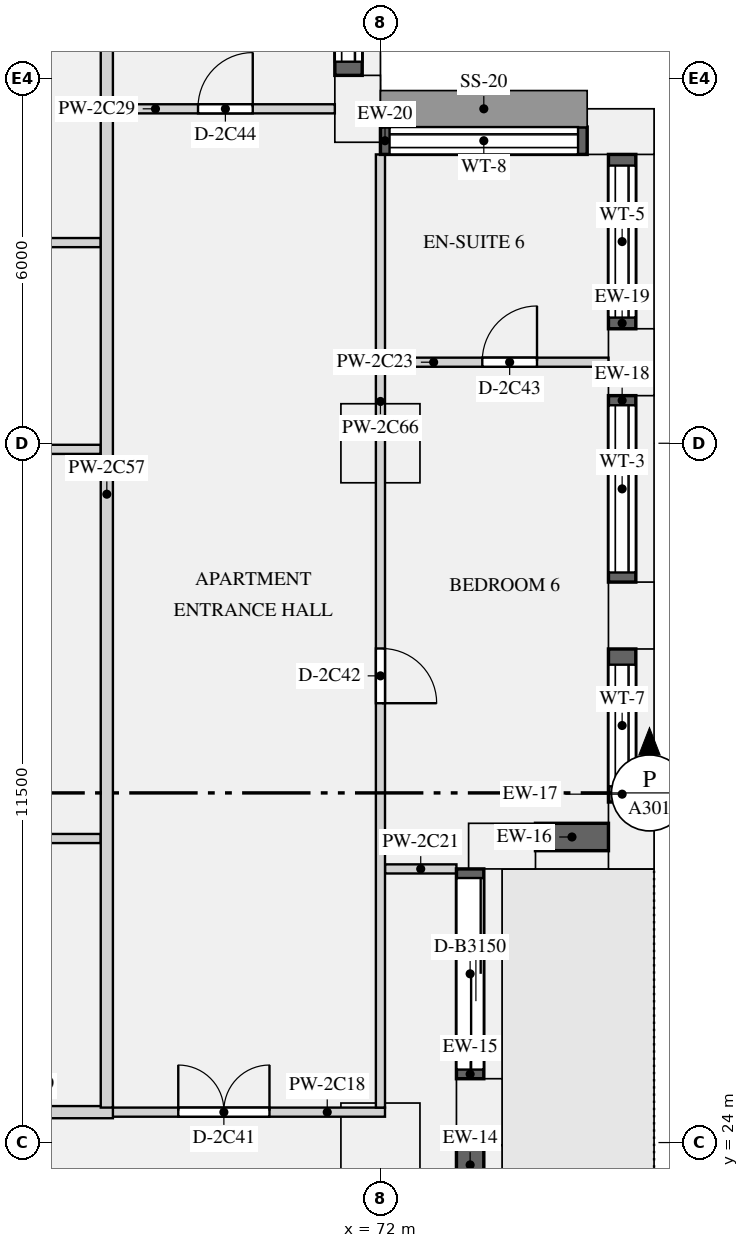
"""IFC4 building model, lengths in metres.
Left out: names, types, materials, properties, quantities, classifications, styles, units other than length and angle.
Written with IfcOpenShell. Run it as: python <this file> out.ifc"""

import sys

from ifc_helpers import new_model, si_unit, direction, frame, frame_2d, origin, origin_2d, place, context, subcontext, project, spatial, rectangle, extrude, element, fill, save


model = new_model("IFC4")
c1 = context("Model", 3, precision=1e-05, world=origin(), true_north=direction((0.0, 1.0)))
c2 = subcontext(c1, "Body", "Model", "MODEL_VIEW")
j1 = project(units=[si_unit("LENGTHUNIT", "METRE"), si_unit("PLANEANGLEUNIT", "RADIAN")], contexts=[c1])
p1 = place(None, origin())
s1 = spatial("IfcSite", under=j1, at=p1, CompositionType="ELEMENT")
p2 = place(p1, origin())
s2 = spatial("IfcBuilding", under=s1, at=p2, CompositionType="ELEMENT")
p3 = place(p2, frame((0.0, 0.0, 102.45)))
s3 = spatial("IfcBuildingStorey", under=s2, at=p3, CompositionType="ELEMENT", Elevation=102.45)
for number, where, z_axis, x_axis in (
    (1, (73.625, 24.5, 0.0), (0.0, 0.0, 1.0), (0.0, 1.0, 0.0)),
    (2, (74.0, 28.875, 0.0), (0.0, 0.0, 1.0), (1.0, 0.0, 0.0)),
    (3, (76.125, 29.05, 0.0), (0.0, 0.0, 1.0), (0.0, 1.0, 0.0)),
    (4, (76.125, 32.667, 0.0), (0.0, 0.0, 1.0), (0.0, 1.0, 0.0)),
    (5, (76.125, 36.833, 0.0), (0.0, 0.0, 1.0), (0.0, 1.0, 0.0)),
    (6, (75.95, 40.625, 0.0), (0.0, 0.0, 1.0), (-1.0, 0.0, 0.0)),
    (7, (71.625, 41.0, 0.0), (0.0, 0.0, 1.0), (0.0, 1.0, 0.0)),
):
    element("IfcColumn", number, at=place(p3, frame(where, z_axis=z_axis, x_axis=x_axis)), inside=s3, PredefinedType="USERDEFINED", context=c2, shape_type="SweptSolid", body=[
        extrude(rectangle(XDim=1.1, YDim=0.75, at=origin_2d()), origin(), (0.0, 0.0, 1.0), 3.15),
    ])
for number, where, z_axis, x_axis in (
    (8, (72.0, 24.0, 0.0), (0.0, 0.0, 1.0), (1.0, 0.0, 0.0)),
    (9, (72.0, 35.5, 0.0), (0.0, 0.0, 1.0), (1.0, 0.0, 0.0)),
):
    element("IfcColumn", number, at=place(p3, frame(where, z_axis=z_axis, x_axis=x_axis)), inside=s3, PredefinedType="COLUMN", context=c2, shape_type="SweptSolid", body=[
        extrude(rectangle(XDim=1.3, YDim=1.3, at=origin_2d()), origin(), (0.0, 0.0, 1.0), 3.15),
    ])
p4 = place(p3, frame((73.475, 21.05, 0.0), z_axis=(0.0, 0.0, 1.0), x_axis=(0.0, 1.0, 0.0)))
e10 = element("IfcWall", 10, at=p4, inside=s3, PredefinedType="SOLIDWALL", context=c2, shape_type="SweptSolid", body=[
    extrude(rectangle(XDim=2.9, YDim=0.45, at=frame_2d((1.45, 0.0))), origin(), (0.0, 0.0, 1.0), 2.83),
])
p5 = place(p4, frame((0.165, 0.0, 0.0)))
e11 = element("IfcOpeningElement", 11, at=p5, cuts=e10, PredefinedType="OPENING", context=c2, shape_type="SweptSolid", body=[
    extrude(rectangle(XDim=2.1, YDim=2.3, at=frame_2d((1.05, 1.15))), frame((0.0, 0.235, 0.0), z_axis=(0.0, -1.0, 0.0), x_axis=(1.0, 0.0, 0.0)), (0.0, 0.0, 1.0), 0.47),
])
p6 = place(p3, frame((73.475, 25.05, 0.0), z_axis=(0.0, 0.0, 1.0), x_axis=(0.0, 1.0, 0.0)))
e12 = element("IfcWall", 12, at=p6, inside=s3, PredefinedType="SOLIDWALL", context=c2, shape_type="SweptSolid", body=[
    extrude(rectangle(XDim=3.45, YDim=0.45, at=frame_2d((1.725, 0.0))), origin(), (0.0, 0.0, 1.0), 2.83),
])
p7 = place(p6, frame((0.15, 0.0, 0.0)))
e13 = element("IfcOpeningElement", 13, at=p7, cuts=e12, PredefinedType="OPENING", context=c2, shape_type="SweptSolid", body=[
    extrude(rectangle(XDim=3.15, YDim=2.3, at=frame_2d((1.575, 1.15))), frame((0.0, 0.235, 0.0), z_axis=(0.0, -1.0, 0.0), x_axis=(1.0, 0.0, 0.0)), (0.0, 0.0, 1.0), 0.47),
])
p8 = place(p3, frame((74.55, 29.025, 0.9), z_axis=(0.0, 0.0, 1.0), x_axis=(1.0, 0.0, 0.0)))
e14 = element("IfcWall", 14, at=p8, inside=s3, PredefinedType="SOLIDWALL", context=c2, shape_type="SweptSolid", body=[
    extrude(rectangle(XDim=1.2, YDim=0.45, at=frame_2d((0.6, 0.0))), origin(), (0.0, 0.0, 1.0), 1.93),
])
p9 = place(p3, frame((75.975, 29.6, 0.9), z_axis=(0.0, 0.0, 1.0), x_axis=(0.0, 1.0, 0.0)))
e15 = element("IfcWall", 15, at=p9, inside=s3, PredefinedType="SOLIDWALL", context=c2, shape_type="SweptSolid", body=[
    extrude(rectangle(XDim=2.517, YDim=0.45, at=frame_2d((1.258, 0.0))), origin(), (0.0, 0.0, 1.0), 1.93),
])
p10 = place(p9, frame((0.259, 0.0, 0.15)))
e16 = element("IfcOpeningElement", 16, at=p10, cuts=e15, PredefinedType="OPENING", context=c2, shape_type="SweptSolid", body=[
    extrude(rectangle(XDim=2.0, YDim=1.5, at=frame_2d((1.0, 0.75))), frame((0.0, 0.235, 0.0), z_axis=(0.0, -1.0, 0.0), x_axis=(1.0, 0.0, 0.0)), (0.0, 0.0, 1.0), 0.47),
])
p11 = place(p3, frame((75.975, 33.217, 0.9), z_axis=(0.0, 0.0, 1.0), x_axis=(0.0, 1.0, 0.0)))
e17 = element("IfcWall", 17, at=p11, inside=s3, PredefinedType="SOLIDWALL", context=c2, shape_type="SweptSolid", body=[
    extrude(rectangle(XDim=3.066, YDim=0.45, at=frame_2d((1.533, 0.0))), origin(), (0.0, 0.0, 1.0), 1.93),
])
p12 = place(p11, frame((0.158, 0.0, 0.15)))
e18 = element("IfcOpeningElement", 18, at=p12, cuts=e17, PredefinedType="OPENING", context=c2, shape_type="SweptSolid", body=[
    extrude(rectangle(XDim=2.75, YDim=1.5, at=frame_2d((1.375, 0.75))), frame((0.0, 0.235, 0.0), z_axis=(0.0, -1.0, 0.0), x_axis=(1.0, 0.0, 0.0)), (0.0, 0.0, 1.0), 0.47),
])
p13 = place(p3, frame((75.975, 37.383, 0.9), z_axis=(0.0, 0.0, 1.0), x_axis=(0.0, 1.0, 0.0)))
e19 = element("IfcWall", 19, at=p13, inside=s3, PredefinedType="SOLIDWALL", context=c2, shape_type="SweptSolid", body=[
    extrude(rectangle(XDim=2.867, YDim=0.45, at=frame_2d((1.434, 0.0))), origin(), (0.0, 0.0, 1.0), 1.93),
])
p14 = place(p13, frame((0.184, 0.0, 0.15)))
e20 = element("IfcOpeningElement", 20, at=p14, cuts=e19, PredefinedType="OPENING", context=c2, shape_type="SweptSolid", body=[
    extrude(rectangle(XDim=2.5, YDim=1.5, at=frame_2d((1.25, 0.75))), frame((0.0, 0.235, 0.0), z_axis=(0.0, -1.0, 0.0), x_axis=(1.0, 0.0, 0.0)), (0.0, 0.0, 1.0), 0.47),
])
p15 = place(p3, frame((75.4, 40.475, 0.9), z_axis=(0.0, 0.0, 1.0), x_axis=(-1.0, 0.0, 0.0)))
e21 = element("IfcWall", 21, at=p15, inside=s3, PredefinedType="SOLIDWALL", context=c2, shape_type="SweptSolid", body=[
    extrude(rectangle(XDim=3.4, YDim=0.45, at=frame_2d((1.7, 0.0))), origin(), (0.0, 0.0, 1.0), 1.93),
])
p16 = place(p15, frame((0.15, 0.0, 0.15)))
e22 = element("IfcOpeningElement", 22, at=p16, cuts=e21, PredefinedType="OPENING", context=c2, shape_type="SweptSolid", body=[
    extrude(rectangle(XDim=3.1, YDim=1.5, at=frame_2d((1.55, 0.75))), frame((0.0, 0.235, 0.0), z_axis=(0.0, -1.0, 0.0), x_axis=(1.0, 0.0, 0.0)), (0.0, 0.0, 1.0), 0.47),
])
p17 = place(p3, frame((71.475, 41.55, 0.9), z_axis=(0.0, 0.0, 1.0), x_axis=(0.0, 1.0, 0.0)))
e23 = element("IfcWall", 23, at=p17, inside=s3, PredefinedType="SOLIDWALL", context=c2, shape_type="SweptSolid", body=[
    extrude(rectangle(XDim=3.2, YDim=0.45, at=frame_2d((1.6, 0.0))), origin(), (0.0, 0.0, 1.0), 1.93),
])
p18 = place(p17, frame((0.225, 0.0, 0.15)))
e24 = element("IfcOpeningElement", 24, at=p18, cuts=e23, PredefinedType="OPENING", context=c2, shape_type="SweptSolid", body=[
    extrude(rectangle(XDim=2.75, YDim=1.5, at=frame_2d((1.375, 0.75))), frame((0.0, 0.235, 0.0), z_axis=(0.0, -1.0, 0.0), x_axis=(1.0, 0.0, 0.0)), (0.0, 0.0, 1.0), 0.47),
])
p19 = place(p3, frame((67.4, 24.5, 0.0), z_axis=(0.0, 0.0, 1.0), x_axis=(1.0, 0.0, 0.0)))
e25 = element("IfcWall", 25, at=p19, inside=s3, PredefinedType="PARTITIONING", context=c2, shape_type="SweptSolid", body=[
    extrude(rectangle(XDim=4.675, YDim=0.15, at=frame_2d((2.337, 0.0))), origin(), (0.0, 0.0, 1.0), 2.83),
])
p20 = place(p19, frame((1.275, 0.0, 0.0)))
e26 = element("IfcOpeningElement", 26, at=p20, cuts=e25, PredefinedType="OPENING", context=c2, shape_type="SweptSolid", body=[
    extrude(rectangle(XDim=1.5, YDim=2.1, at=frame_2d((0.75, 1.05))), frame((0.0, 0.085, 0.0), z_axis=(0.0, -1.0, 0.0), x_axis=(1.0, 0.0, 0.0)), (0.0, 0.0, 1.0), 0.17),
])
p21 = place(p3, frame((64.4, 24.5, 0.0), z_axis=(0.0, 0.0, 1.0), x_axis=(1.0, 0.0, 0.0)))
e27 = element("IfcWall", 27, at=p21, inside=s3, PredefinedType="PARTITIONING", context=c2, shape_type="SweptSolid", body=[
    extrude(rectangle(XDim=3.2, YDim=0.2, at=frame_2d((1.6, 0.0))), origin(), (0.0, 0.0, 1.0), 2.83),
])
p22 = place(p3, frame((72.075, 28.5, 0.0), z_axis=(0.0, 0.0, 1.0), x_axis=(1.0, 0.0, 0.0)))
e28 = element("IfcWall", 28, at=p22, inside=s3, PredefinedType="PARTITIONING", context=c2, shape_type="SweptSolid", body=[
    extrude(rectangle(XDim=1.175, YDim=0.15, at=frame_2d((0.587, 0.0))), origin(), (0.0, 0.0, 1.0), 2.83),
])
p23 = place(p3, frame((72.075, 36.833, 0.0), z_axis=(0.0, 0.0, 1.0), x_axis=(1.0, 0.0, 0.0)))
e29 = element("IfcWall", 29, at=p23, inside=s3, PredefinedType="PARTITIONING", context=c2, shape_type="SweptSolid", body=[
    extrude(rectangle(XDim=3.675, YDim=0.15, at=frame_2d((1.837, 0.0))), origin(), (0.0, 0.0, 1.0), 2.83),
])
p24 = place(p23, frame((1.6, 0.0, 0.0)))
e30 = element("IfcOpeningElement", 30, at=p24, cuts=e29, PredefinedType="OPENING", context=c2, shape_type="SweptSolid", body=[
    extrude(rectangle(XDim=0.9, YDim=2.1, at=frame_2d((0.45, 1.05))), frame((0.0, 0.085, 0.0), z_axis=(0.0, -1.0, 0.0), x_axis=(1.0, 0.0, 0.0)), (0.0, 0.0, 1.0), 0.17),
])
p25 = place(p3, frame((59.8, 35.4, 0.0), z_axis=(0.0, 0.0, 1.0), x_axis=(1.0, 0.0, 0.0)))
e31 = element("IfcWall", 31, at=p25, inside=s3, PredefinedType="PARTITIONING", context=c2, shape_type="SweptSolid", body=[
    extrude(rectangle(XDim=7.6, YDim=0.15, at=frame_2d((3.8, 0.0))), origin(), (0.0, 0.0, 1.0), 2.83),
])
p26 = place(p25, frame((5.025, 0.0, 0.0)))
e32 = element("IfcOpeningElement", 32, at=p26, cuts=e31, PredefinedType="OPENING", context=c2, shape_type="SweptSolid", body=[
    extrude(rectangle(XDim=1.5, YDim=2.1, at=frame_2d((0.75, 1.05))), frame((0.0, 0.085, 0.0), z_axis=(0.0, -1.0, 0.0), x_axis=(1.0, 0.0, 0.0)), (0.0, 0.0, 1.0), 0.17),
])
p27 = place(p3, frame((67.6, 41.0, 0.0), z_axis=(0.0, 0.0, 1.0), x_axis=(1.0, 0.0, 0.0)))
e33 = element("IfcWall", 33, at=p27, inside=s3, PredefinedType="PARTITIONING", context=c2, shape_type="SweptSolid", body=[
    extrude(rectangle(XDim=3.65, YDim=0.15, at=frame_2d((1.825, 0.0))), origin(), (0.0, 0.0, 1.0), 2.83),
])
p28 = place(p27, frame((1.4, 0.0, 0.0)))
e34 = element("IfcOpeningElement", 34, at=p28, cuts=e33, PredefinedType="OPENING", context=c2, shape_type="SweptSolid", body=[
    extrude(rectangle(XDim=0.9, YDim=2.1, at=frame_2d((0.45, 1.05))), frame((0.0, 0.085, 0.0), z_axis=(0.0, -1.0, 0.0), x_axis=(1.0, 0.0, 0.0)), (0.0, 0.0, 1.0), 0.17),
])
p29 = place(p3, frame((47.925, 38.8, 0.0), z_axis=(0.0, 0.0, 1.0), x_axis=(1.0, 0.0, 0.0)))
e35 = element("IfcWall", 35, at=p29, inside=s3, PredefinedType="PARTITIONING", context=c2, shape_type="SweptSolid", body=[
    extrude(rectangle(XDim=19.475, YDim=0.15, at=frame_2d((9.737, 0.0))), origin(), (0.0, 0.0, 1.0), 2.83),
])
p30 = place(p29, frame((3.375, 0.0, 0.0)))
e36 = element("IfcOpeningElement", 36, at=p30, cuts=e35, PredefinedType="OPENING", context=c2, shape_type="SweptSolid", body=[
    extrude(rectangle(XDim=0.9, YDim=2.1, at=frame_2d((0.45, 1.05))), frame((0.0, 0.085, 0.0), z_axis=(0.0, -1.0, 0.0), x_axis=(1.0, 0.0, 0.0)), (0.0, 0.0, 1.0), 0.17),
])
p31 = place(p29, frame((7.875, 0.0, 0.0)))
e37 = element("IfcOpeningElement", 37, at=p31, cuts=e35, PredefinedType="OPENING", context=c2, shape_type="SweptSolid", body=[
    extrude(rectangle(XDim=0.9, YDim=2.1, at=frame_2d((0.45, 1.05))), frame((0.0, 0.085, 0.0), z_axis=(0.0, -1.0, 0.0), x_axis=(1.0, 0.0, 0.0)), (0.0, 0.0, 1.0), 0.17),
])
p32 = place(p29, frame((16.875, 0.0, 0.0)))
e38 = element("IfcOpeningElement", 38, at=p32, cuts=e35, PredefinedType="OPENING", context=c2, shape_type="SweptSolid", body=[
    extrude(rectangle(XDim=0.9, YDim=2.1, at=frame_2d((0.45, 1.05))), frame((0.0, 0.085, 0.0), z_axis=(0.0, -1.0, 0.0), x_axis=(1.0, 0.0, 0.0)), (0.0, 0.0, 1.0), 0.17),
])
p33 = place(p3, frame((59.8, 29.0, 0.0), z_axis=(0.0, 0.0, 1.0), x_axis=(1.0, 0.0, 0.0)))
e39 = element("IfcWall", 39, at=p33, inside=s3, PredefinedType="PARTITIONING", context=c2, shape_type="SweptSolid", body=[
    extrude(rectangle(XDim=7.6, YDim=0.15, at=frame_2d((3.8, 0.0))), origin(), (0.0, 0.0, 1.0), 2.83),
])
p34 = place(p33, frame((1.9, 0.0, 0.0)))
e40 = element("IfcOpeningElement", 40, at=p34, cuts=e39, PredefinedType="OPENING", context=c2, shape_type="SweptSolid", body=[
    extrude(rectangle(XDim=0.9, YDim=2.1, at=frame_2d((0.45, 1.05))), frame((0.0, 0.085, 0.0), z_axis=(0.0, -1.0, 0.0), x_axis=(1.0, 0.0, 0.0)), (0.0, 0.0, 1.0), 0.17),
])
p35 = place(p3, frame((67.5, 24.575, 0.0), z_axis=(0.0, 0.0, 1.0), x_axis=(0.0, 1.0, 0.0)))
e41 = element("IfcWall", 41, at=p35, inside=s3, PredefinedType="PARTITIONING", context=c2, shape_type="SweptSolid", body=[
    extrude(rectangle(XDim=20.175, YDim=0.2, at=frame_2d((10.087, 0.0))), origin(), (0.0, 0.0, 1.0), 2.83),
])
p36 = place(p3, frame((72.0, 24.575, 0.0), z_axis=(0.0, 0.0, 1.0), x_axis=(0.0, 1.0, 0.0)))
e42 = element("IfcWall", 42, at=p36, inside=s3, PredefinedType="PARTITIONING", context=c2, shape_type="SweptSolid", body=[
    extrude(rectangle(XDim=15.675, YDim=0.15, at=frame_2d((7.837, 0.0))), origin(), (0.0, 0.0, 1.0), 2.83),
])
p37 = place(p36, frame((6.65, 0.0, 0.0)))
e43 = element("IfcOpeningElement", 43, at=p37, cuts=e42, PredefinedType="OPENING", context=c2, shape_type="SweptSolid", body=[
    extrude(rectangle(XDim=0.9, YDim=2.1, at=frame_2d((0.45, 1.05))), frame((0.0, 0.085, 0.0), z_axis=(0.0, -1.0, 0.0), x_axis=(1.0, 0.0, 0.0)), (0.0, 0.0, 1.0), 0.17),
])
p38 = place(p7, origin())
e44 = element("IfcDoor", 44, at=p38, inside=s3, OperationType="SLIDING_TO_LEFT", PredefinedType="DOOR", context=c2, shape_type="SweptSolid", body=[
    extrude(rectangle(XDim=3.15, YDim=2.3, at=frame_2d((1.575, 1.15))), frame((0.0, -0.07, 0.0), z_axis=(0.0, -1.0, 0.0), x_axis=(1.0, 0.0, 0.0)), (0.0, 0.0, 1.0), 0.05),
])
fill(e13, e44)
p39 = place(p10, origin())
e45 = element("IfcWindow", 45, at=p39, inside=s3, PartitioningType="SINGLE_PANEL", PredefinedType="WINDOW", context=c2, shape_type="SweptSolid", body=[
    extrude(rectangle(XDim=2.0, YDim=1.5, at=frame_2d((1.0, 0.75))), frame((0.0, -0.065, 0.0), z_axis=(0.0, -1.0, 0.0), x_axis=(1.0, 0.0, 0.0)), (0.0, 0.0, 1.0), 0.06),
])
fill(e16, e45)
p40 = place(p12, origin())
e46 = element("IfcWindow", 46, at=p40, inside=s3, PartitioningType="SINGLE_PANEL", PredefinedType="WINDOW", context=c2, shape_type="SweptSolid", body=[
    extrude(rectangle(XDim=2.75, YDim=1.5, at=frame_2d((1.375, 0.75))), frame((0.0, -0.065, 0.0), z_axis=(0.0, -1.0, 0.0), x_axis=(1.0, 0.0, 0.0)), (0.0, 0.0, 1.0), 0.06),
])
fill(e18, e46)
p41 = place(p14, origin())
e47 = element("IfcWindow", 47, at=p41, inside=s3, PartitioningType="SINGLE_PANEL", PredefinedType="WINDOW", context=c2, shape_type="SweptSolid", body=[
    extrude(rectangle(XDim=2.5, YDim=1.5, at=frame_2d((1.25, 0.75))), frame((0.0, -0.065, 0.0), z_axis=(0.0, -1.0, 0.0), x_axis=(1.0, 0.0, 0.0)), (0.0, 0.0, 1.0), 0.06),
])
fill(e20, e47)
p42 = place(p16, origin())
e48 = element("IfcWindow", 48, at=p42, inside=s3, PartitioningType="SINGLE_PANEL", PredefinedType="WINDOW", context=c2, shape_type="SweptSolid", body=[
    extrude(rectangle(XDim=3.1, YDim=1.5, at=frame_2d((1.55, 0.75))), frame((0.0, -0.065, 0.0), z_axis=(0.0, -1.0, 0.0), x_axis=(1.0, 0.0, 0.0)), (0.0, 0.0, 1.0), 0.06),
])
fill(e22, e48)
p43 = place(p18, origin())
e49 = element("IfcWindow", 49, at=p43, inside=s3, PartitioningType="SINGLE_PANEL", PredefinedType="WINDOW", context=c2, shape_type="SweptSolid", body=[
    extrude(rectangle(XDim=2.75, YDim=1.5, at=frame_2d((1.375, 0.75))), frame((0.0, -0.065, 0.0), z_axis=(0.0, -1.0, 0.0), x_axis=(1.0, 0.0, 0.0)), (0.0, 0.0, 1.0), 0.06),
])
fill(e24, e49)
p44 = place(p20, origin())
e50 = element("IfcDoor", 50, at=p44, inside=s3, OperationType="DOUBLE_DOOR_SINGLE_SWING", PredefinedType="DOOR", context=c2, shape_type="SweptSolid", body=[
    extrude(rectangle(XDim=1.5, YDim=2.1, at=frame_2d((0.75, 1.05))), frame((0.0, 0.025, 0.0), z_axis=(0.0, -1.0, 0.0), x_axis=(1.0, 0.0, 0.0)), (0.0, 0.0, 1.0), 0.05),
])
fill(e26, e50)
p45 = place(p37, frame((0.9, 0.0, 0.0), z_axis=(0.0, 0.0, 1.0), x_axis=(-1.0, 0.0, 0.0)))
e51 = element("IfcDoor", 51, at=p45, inside=s3, OperationType="SINGLE_SWING_RIGHT", PredefinedType="DOOR", context=c2, shape_type="SweptSolid", body=[
    extrude(rectangle(XDim=0.9, YDim=2.1, at=frame_2d((0.45, 1.05))), frame((0.0, 0.025, 0.0), z_axis=(0.0, -1.0, 0.0), x_axis=(1.0, 0.0, 0.0)), (0.0, 0.0, 1.0), 0.05),
])
fill(e43, e51)
p46 = place(p24, origin())
e52 = element("IfcDoor", 52, at=p46, inside=s3, OperationType="SINGLE_SWING_RIGHT", PredefinedType="DOOR", context=c2, shape_type="SweptSolid", body=[
    extrude(rectangle(XDim=0.9, YDim=2.1, at=frame_2d((0.45, 1.05))), frame((0.0, 0.025, 0.0), z_axis=(0.0, -1.0, 0.0), x_axis=(1.0, 0.0, 0.0)), (0.0, 0.0, 1.0), 0.05),
])
fill(e30, e52)
p47 = place(p28, origin())
e53 = element("IfcDoor", 53, at=p47, inside=s3, OperationType="SINGLE_SWING_RIGHT", PredefinedType="DOOR", context=c2, shape_type="SweptSolid", body=[
    extrude(rectangle(XDim=0.9, YDim=2.1, at=frame_2d((0.45, 1.05))), frame((0.0, 0.025, 0.0), z_axis=(0.0, -1.0, 0.0), x_axis=(1.0, 0.0, 0.0)), (0.0, 0.0, 1.0), 0.05),
])
fill(e34, e53)
save(model, sys.argv[1])
